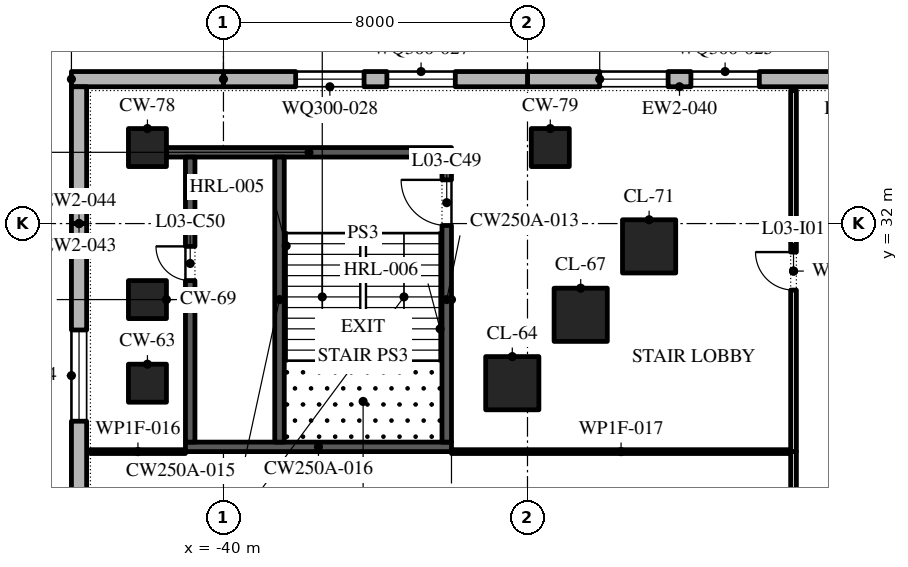
"""IFC4 building model, lengths in metres.
Left out: names, types, materials, properties, quantities, classifications, styles, units other than length and angle.
Written with IfcOpenShell. Run it as: python <this file> out.ifc"""

import sys

from ifc_helpers import new_model, si_unit, direction, frame, frame_2d, origin, origin_2d, place, context, subcontext, project, spatial, polyline, rectangle, outline, extrude, element, fill, save


model = new_model("IFC4")
c1 = context("Model", 3, precision=1e-05, world=origin(), true_north=direction((0.0, 1.0)))
c2 = subcontext(c1, "Body", "Model", "MODEL_VIEW")
j1 = project(units=[si_unit("LENGTHUNIT", "METRE"), si_unit("PLANEANGLEUNIT", "RADIAN")], contexts=[c1])
p1 = place(None, origin())
s1 = spatial("IfcSite", under=j1, at=p1, CompositionType="ELEMENT")
p2 = place(p1, origin())
s2 = spatial("IfcBuilding", under=s1, at=p2, CompositionType="ELEMENT")
p3 = place(p2, frame((0.0, 0.0, 19.2)))
s3 = spatial("IfcBuildingStorey", under=s2, at=p3, CompositionType="ELEMENT", Elevation=19.2)
p4 = place(p3, frame((-42.0, 27.8, 0.0), z_axis=(0.0, 0.0, 1.0), x_axis=(1.0, 0.0, 0.0)))
e1 = element("IfcColumn", 1, at=p4, inside=s3, PredefinedType="COLUMN", context=c2, shape_type="SweptSolid", body=[
    extrude(rectangle(XDim=1.0, YDim=1.0, at=origin_2d()), origin(), (0.0, 0.0, 1.0), 4.8),
])
for number, where, z_axis, x_axis in (
    (2, (-32.4, 27.8, 0.0), (0.0, 0.0, 1.0), (1.0, 0.0, 0.0)),
    (3, (-30.6, 29.6, 0.0), (0.0, 0.0, 1.0), (1.0, 0.0, 0.0)),
):
    element("IfcColumn", number, at=place(p3, frame(where, z_axis=z_axis, x_axis=x_axis)), inside=s3, PredefinedType="COLUMN", context=c2, shape_type="SweptSolid", body=[
        extrude(rectangle(XDim=1.4, YDim=1.4, at=origin_2d()), origin(), (0.0, 0.0, 1.0), 4.8),
    ])
p5 = place(p3, frame((-42.0, 30.0, 0.0), z_axis=(0.0, 0.0, 1.0), x_axis=(1.0, 0.0, 0.0)))
e4 = element("IfcColumn", 4, at=p5, inside=s3, PredefinedType="COLUMN", context=c2, shape_type="SweptSolid", body=[
    extrude(rectangle(XDim=1.0, YDim=1.0, at=origin_2d()), origin(), (0.0, 0.0, 1.0), 4.8),
])
p6 = place(p3, frame((-28.8, 31.4, 0.0), z_axis=(0.0, 0.0, 1.0), x_axis=(1.0, 0.0, 0.0)))
e5 = element("IfcColumn", 5, at=p6, inside=s3, PredefinedType="COLUMN", context=c2, shape_type="SweptSolid", body=[
    extrude(rectangle(XDim=1.4, YDim=1.4, at=origin_2d()), origin(), (0.0, 0.0, 1.0), 4.8),
])
for number, where, z_axis, x_axis in (
    (6, (-42.0, 34.0, 0.0), (0.0, 0.0, 1.0), (1.0, 0.0, 0.0)),
    (7, (-31.4, 34.0, 0.0), (0.0, 0.0, 1.0), (1.0, 0.0, 0.0)),
):
    element("IfcColumn", number, at=place(p3, frame(where, z_axis=z_axis, x_axis=x_axis)), inside=s3, PredefinedType="COLUMN", context=c2, shape_type="SweptSolid", body=[
        extrude(rectangle(XDim=1.0, YDim=1.0, at=origin_2d()), origin(), (0.0, 0.0, 1.0), 4.8),
    ])
p7 = place(p3, frame((-24.0, 35.8, 0.0), z_axis=(0.0, 0.0, 1.0), x_axis=(-1.0, 0.0, 0.0)))
e8 = element("IfcWall", 8, at=p7, inside=s3, PredefinedType="STANDARD", context=c2, shape_type="SweptSolid", body=[
    extrude(rectangle(XDim=8.0, YDim=0.4, at=frame_2d((4.0, 0.0))), origin(), (0.0, 0.0, 1.0), 4.5),
])
p8 = place(p7, frame((1.9, 0.0, 0.9)))
e9 = element("IfcOpeningElement", 9, at=p8, cuts=e8, PredefinedType="OPENING", context=c2, shape_type="SweptSolid", body=[
    extrude(outline(polyline([(0.0, 0.0), (1.8, 0.0), (1.8, 1.5), (1.785, 1.729), (1.738, 1.954), (1.662, 2.17), (1.558, 2.375), (1.427, 2.563), (1.271, 2.732), (1.095, 2.879), (0.9, 3.0), (0.705, 2.879), (0.529, 2.732), (0.373, 2.563), (0.242, 2.375), (0.138, 2.17), (0.062, 1.954), (0.015, 1.729), (0.0, 1.5), (0.0, 0.0)])), frame((0.0, 0.21, 0.0), z_axis=(0.0, -1.0, 0.0), x_axis=(1.0, 0.0, 0.0)), (0.0, 0.0, 1.0), 0.42),
])
p9 = place(p7, frame((4.3, 0.0, 0.9)))
e10 = element("IfcOpeningElement", 10, at=p9, cuts=e8, PredefinedType="OPENING", context=c2, shape_type="SweptSolid", body=[
    extrude(outline(polyline([(0.0, 0.0), (1.8, 0.0), (1.8, 1.5), (1.785, 1.729), (1.738, 1.954), (1.662, 2.17), (1.558, 2.375), (1.427, 2.563), (1.271, 2.732), (1.095, 2.879), (0.9, 3.0), (0.705, 2.879), (0.529, 2.732), (0.373, 2.563), (0.242, 2.375), (0.138, 2.17), (0.062, 1.954), (0.015, 1.729), (0.0, 1.5), (0.0, 0.0)])), frame((0.0, 0.21, 0.0), z_axis=(0.0, -1.0, 0.0), x_axis=(1.0, 0.0, 0.0)), (0.0, 0.0, 1.0), 0.42),
])
p10 = place(p3, frame((-32.0, 35.8, 0.0), z_axis=(0.0, 0.0, 1.0), x_axis=(-1.0, 0.0, 0.0)))
e11 = element("IfcWall", 11, at=p10, inside=s3, PredefinedType="STANDARD", context=c2, shape_type="SweptSolid", body=[
    extrude(rectangle(XDim=8.0, YDim=0.4, at=frame_2d((4.0, 0.0))), origin(), (0.0, 0.0, 1.0), 4.5),
])
p11 = place(p10, frame((1.9, 0.0, 0.9)))
e12 = element("IfcOpeningElement", 12, at=p11, cuts=e11, PredefinedType="OPENING", context=c2, shape_type="SweptSolid", body=[
    extrude(outline(polyline([(0.0, 0.0), (1.8, 0.0), (1.8, 1.5), (1.785, 1.729), (1.738, 1.954), (1.662, 2.17), (1.558, 2.375), (1.427, 2.563), (1.271, 2.732), (1.095, 2.879), (0.9, 3.0), (0.705, 2.879), (0.529, 2.732), (0.373, 2.563), (0.242, 2.375), (0.138, 2.17), (0.062, 1.954), (0.015, 1.729), (0.0, 1.5), (0.0, 0.0)])), frame((0.0, 0.21, 0.0), z_axis=(0.0, -1.0, 0.0), x_axis=(1.0, 0.0, 0.0)), (0.0, 0.0, 1.0), 0.42),
])
p12 = place(p10, frame((4.3, 0.0, 0.9)))
e13 = element("IfcOpeningElement", 13, at=p12, cuts=e11, PredefinedType="OPENING", context=c2, shape_type="SweptSolid", body=[
    extrude(outline(polyline([(0.0, 0.0), (1.8, 0.0), (1.8, 1.5), (1.785, 1.729), (1.738, 1.954), (1.662, 2.17), (1.558, 2.375), (1.427, 2.563), (1.271, 2.732), (1.095, 2.879), (0.9, 3.0), (0.705, 2.879), (0.529, 2.732), (0.373, 2.563), (0.242, 2.375), (0.138, 2.17), (0.062, 1.954), (0.015, 1.729), (0.0, 1.5), (0.0, 0.0)])), frame((0.0, 0.21, 0.0), z_axis=(0.0, -1.0, 0.0), x_axis=(1.0, 0.0, 0.0)), (0.0, 0.0, 1.0), 0.42),
])
p13 = place(p3, frame((-40.0, 35.8, 0.0), z_axis=(0.0, 0.0, 1.0), x_axis=(-1.0, 0.0, 0.0)))
e14 = element("IfcWall", 14, at=p13, inside=s3, PredefinedType="STANDARD", context=c2, shape_type="SweptSolid", body=[
    extrude(rectangle(XDim=4.0, YDim=0.4, at=frame_2d((2.0, 0.0))), origin(), (0.0, 0.0, 1.0), 4.5),
])
p14 = place(p3, frame((-43.8, 35.6, 0.0), z_axis=(0.0, 0.0, 1.0), x_axis=(0.0, -1.0, 0.0)))
e15 = element("IfcWall", 15, at=p14, inside=s3, PredefinedType="STANDARD", context=c2, shape_type="SweptSolid", body=[
    extrude(rectangle(XDim=3.6, YDim=0.4, at=frame_2d((1.8, 0.0))), origin(), (0.0, 0.0, 1.0), 4.5),
])
p15 = place(p3, frame((-43.8, 32.0, 0.0), z_axis=(0.0, 0.0, 1.0), x_axis=(0.0, -1.0, 0.0)))
e16 = element("IfcWall", 16, at=p15, inside=s3, PredefinedType="STANDARD", context=c2, shape_type="SweptSolid", body=[
    extrude(rectangle(XDim=8.0, YDim=0.4, at=frame_2d((4.0, 0.0))), origin(), (0.0, 0.0, 1.0), 4.5),
])
p16 = place(p15, frame((2.8, 0.0, 0.9)))
e17 = element("IfcOpeningElement", 17, at=p16, cuts=e16, PredefinedType="OPENING", context=c2, shape_type="SweptSolid", body=[
    extrude(outline(polyline([(0.0, 0.0), (2.4, 0.0), (2.4, 1.5), (2.378, 1.758), (2.313, 2.009), (2.207, 2.245), (2.063, 2.46), (1.885, 2.648), (1.677, 2.804), (1.447, 2.922), (1.2, 3.0), (0.953, 2.922), (0.722, 2.804), (0.515, 2.648), (0.337, 2.46), (0.193, 2.245), (0.087, 2.009), (0.022, 1.758), (0.0, 1.5), (0.0, 0.0)])), frame((0.0, 0.21, 0.0), z_axis=(0.0, -1.0, 0.0), x_axis=(1.0, 0.0, 0.0)), (0.0, 0.0, 1.0), 0.42),
])
p17 = place(p3, frame((-41.0, 26.125, 0.0), z_axis=(0.0, 0.0, 1.0), x_axis=(1.0, 0.0, 0.0)))
e18 = element("IfcWall", 18, at=p17, inside=s3, PredefinedType="SHEAR", context=c2, shape_type="SweptSolid", body=[
    extrude(rectangle(XDim=7.0, YDim=0.25, at=frame_2d((3.5, 0.0))), origin(), (0.0, 0.0, 1.0), 4.5),
])
p18 = place(p3, frame((-41.5, 33.875, 0.0), z_axis=(0.0, 0.0, 1.0), x_axis=(1.0, 0.0, 0.0)))
e19 = element("IfcWall", 19, at=p18, inside=s3, PredefinedType="SHEAR", context=c2, shape_type="SweptSolid", body=[
    extrude(rectangle(XDim=7.5, YDim=0.25, at=frame_2d((3.75, 0.0))), origin(), (0.0, 0.0, 1.0), 4.5),
])
p19 = place(p3, frame((-40.875, 26.25, 0.0), z_axis=(0.0, 0.0, 1.0), x_axis=(0.0, 1.0, 0.0)))
e20 = element("IfcWall", 20, at=p19, inside=s3, PredefinedType="SHEAR", context=c2, shape_type="SweptSolid", body=[
    extrude(rectangle(XDim=7.5, YDim=0.25, at=frame_2d((3.75, 0.0))), origin(), (0.0, 0.0, 1.0), 4.5),
])
p20 = place(p19, frame((4.25, 0.0, 0.0)))
e21 = element("IfcOpeningElement", 21, at=p20, cuts=e20, PredefinedType="OPENING", context=c2, shape_type="SweptSolid", body=[
    extrude(rectangle(XDim=0.9, YDim=2.1, at=frame_2d((0.45, 1.05))), frame((0.0, 0.135, 0.0), z_axis=(0.0, -1.0, 0.0), x_axis=(1.0, 0.0, 0.0)), (0.0, 0.0, 1.0), 0.27),
])
p21 = place(p3, frame((-34.125, 26.25, 0.0), z_axis=(0.0, 0.0, 1.0), x_axis=(0.0, 1.0, 0.0)))
e22 = element("IfcWall", 22, at=p21, inside=s3, PredefinedType="SHEAR", context=c2, shape_type="SweptSolid", body=[
    extrude(rectangle(XDim=7.5, YDim=0.25, at=frame_2d((3.75, 0.0))), origin(), (0.0, 0.0, 1.0), 4.5),
])
p22 = place(p21, frame((5.7, 0.0, 0.0)))
e23 = element("IfcOpeningElement", 23, at=p22, cuts=e22, PredefinedType="OPENING", context=c2, shape_type="SweptSolid", body=[
    extrude(rectangle(XDim=1.2, YDim=2.1, at=frame_2d((0.6, 1.05))), frame((0.0, 0.135, 0.0), z_axis=(0.0, -1.0, 0.0), x_axis=(1.0, 0.0, 0.0)), (0.0, 0.0, 1.0), 0.27),
])
p23 = place(p3, frame((-38.525, 26.25, 0.0), z_axis=(0.0, 0.0, 1.0), x_axis=(0.0, 1.0, 0.0)))
e24 = element("IfcWall", 24, at=p23, inside=s3, PredefinedType="SHEAR", context=c2, shape_type="SweptSolid", body=[
    extrude(rectangle(XDim=7.5, YDim=0.25, at=frame_2d((3.75, 0.0))), origin(), (0.0, 0.0, 1.0), 4.5),
])
p24 = place(p3, frame((-43.5, 26.0, 0.0), z_axis=(0.0, 0.0, 1.0), x_axis=(1.0, 0.0, 0.0)))
e25 = element("IfcWall", 25, at=p24, inside=s3, PredefinedType="PARTITIONING", context=c2, shape_type="SweptSolid", body=[
    extrude(rectangle(XDim=2.5, YDim=0.1, at=frame_2d((1.25, 0.0))), origin(), (0.0, 0.0, 1.0), 4.5),
])
p25 = place(p3, frame((-34.0, 26.0, 0.0), z_axis=(0.0, 0.0, 1.0), x_axis=(1.0, 0.0, 0.0)))
e26 = element("IfcWall", 26, at=p25, inside=s3, PredefinedType="PARTITIONING", context=c2, shape_type="SweptSolid", body=[
    extrude(rectangle(XDim=8.925, YDim=0.1, at=frame_2d((4.462, 0.0))), origin(), (0.0, 0.0, 1.0), 4.5),
])
p26 = place(p3, frame((-25.0, 17.0, 0.0), z_axis=(0.0, 0.0, 1.0), x_axis=(0.0, 1.0, 0.0)))
e27 = element("IfcWall", 27, at=p26, inside=s3, PredefinedType="PARTITIONING", context=c2, shape_type="SweptSolid", body=[
    extrude(rectangle(XDim=9.0, YDim=0.15, at=frame_2d((4.5, 0.0))), origin(), (0.0, 0.0, 1.0), 4.5),
])
p27 = place(p26, frame((3.6, 0.0, 0.0)))
e28 = element("IfcOpeningElement", 28, at=p27, cuts=e27, PredefinedType="OPENING", context=c2, shape_type="SweptSolid", body=[
    extrude(rectangle(XDim=1.8, YDim=2.1, at=frame_2d((0.9, 1.05))), frame((0.0, 0.085, 0.0), z_axis=(0.0, -1.0, 0.0), x_axis=(1.0, 0.0, 0.0)), (0.0, 0.0, 1.0), 0.17),
])
p28 = place(p3, frame((-25.0, 26.0, 0.0), z_axis=(0.0, 0.0, 1.0), x_axis=(0.0, 1.0, 0.0)))
e29 = element("IfcWall", 29, at=p28, inside=s3, PredefinedType="PARTITIONING", context=c2, shape_type="SweptSolid", body=[
    extrude(rectangle(XDim=9.5, YDim=0.15, at=frame_2d((4.75, 0.0))), origin(), (0.0, 0.0, 1.0), 4.5),
])
p29 = place(p28, frame((4.25, 0.0, 0.0)))
e30 = element("IfcOpeningElement", 30, at=p29, cuts=e29, PredefinedType="OPENING", context=c2, shape_type="SweptSolid", body=[
    extrude(rectangle(XDim=1.0, YDim=2.1, at=frame_2d((0.5, 1.05))), frame((0.0, 0.085, 0.0), z_axis=(0.0, -1.0, 0.0), x_axis=(1.0, 0.0, 0.0)), (0.0, 0.0, 1.0), 0.17),
])
p30 = place(p8, origin())
e31 = element("IfcWindow", 31, at=p30, inside=s3, PartitioningType="DOUBLE_PANEL_VERTICAL", PredefinedType="WINDOW", context=c2, shape_type="SweptSolid", body=[
    extrude(outline(polyline([(0.0, 0.0), (1.8, 0.0), (1.8, 1.5), (1.785, 1.729), (1.738, 1.954), (1.662, 2.17), (1.558, 2.375), (1.427, 2.563), (1.271, 2.732), (1.095, 2.879), (0.9, 3.0), (0.705, 2.879), (0.529, 2.732), (0.373, 2.563), (0.242, 2.375), (0.138, 2.17), (0.062, 1.954), (0.015, 1.729), (0.0, 1.5), (0.0, 0.0)])), frame((0.0, 0.03, 0.0), z_axis=(0.0, -1.0, 0.0), x_axis=(1.0, 0.0, 0.0)), (0.0, 0.0, 1.0), 0.06),
])
fill(e9, e31)
p31 = place(p9, origin())
e32 = element("IfcWindow", 32, at=p31, inside=s3, PartitioningType="DOUBLE_PANEL_VERTICAL", PredefinedType="WINDOW", context=c2, shape_type="SweptSolid", body=[
    extrude(outline(polyline([(0.0, 0.0), (1.8, 0.0), (1.8, 1.5), (1.785, 1.729), (1.738, 1.954), (1.662, 2.17), (1.558, 2.375), (1.427, 2.563), (1.271, 2.732), (1.095, 2.879), (0.9, 3.0), (0.705, 2.879), (0.529, 2.732), (0.373, 2.563), (0.242, 2.375), (0.138, 2.17), (0.062, 1.954), (0.015, 1.729), (0.0, 1.5), (0.0, 0.0)])), frame((0.0, 0.03, 0.0), z_axis=(0.0, -1.0, 0.0), x_axis=(1.0, 0.0, 0.0)), (0.0, 0.0, 1.0), 0.06),
])
fill(e10, e32)
p32 = place(p11, origin())
e33 = element("IfcWindow", 33, at=p32, inside=s3, PartitioningType="DOUBLE_PANEL_VERTICAL", PredefinedType="WINDOW", context=c2, shape_type="SweptSolid", body=[
    extrude(outline(polyline([(0.0, 0.0), (1.8, 0.0), (1.8, 1.5), (1.785, 1.729), (1.738, 1.954), (1.662, 2.17), (1.558, 2.375), (1.427, 2.563), (1.271, 2.732), (1.095, 2.879), (0.9, 3.0), (0.705, 2.879), (0.529, 2.732), (0.373, 2.563), (0.242, 2.375), (0.138, 2.17), (0.062, 1.954), (0.015, 1.729), (0.0, 1.5), (0.0, 0.0)])), frame((0.0, 0.03, 0.0), z_axis=(0.0, -1.0, 0.0), x_axis=(1.0, 0.0, 0.0)), (0.0, 0.0, 1.0), 0.06),
])
fill(e12, e33)
p33 = place(p12, origin())
e34 = element("IfcWindow", 34, at=p33, inside=s3, PartitioningType="DOUBLE_PANEL_VERTICAL", PredefinedType="WINDOW", context=c2, shape_type="SweptSolid", body=[
    extrude(outline(polyline([(0.0, 0.0), (1.8, 0.0), (1.8, 1.5), (1.785, 1.729), (1.738, 1.954), (1.662, 2.17), (1.558, 2.375), (1.427, 2.563), (1.271, 2.732), (1.095, 2.879), (0.9, 3.0), (0.705, 2.879), (0.529, 2.732), (0.373, 2.563), (0.242, 2.375), (0.138, 2.17), (0.062, 1.954), (0.015, 1.729), (0.0, 1.5), (0.0, 0.0)])), frame((0.0, 0.03, 0.0), z_axis=(0.0, -1.0, 0.0), x_axis=(1.0, 0.0, 0.0)), (0.0, 0.0, 1.0), 0.06),
])
fill(e13, e34)
p34 = place(p16, origin())
e35 = element("IfcWindow", 35, at=p34, inside=s3, PartitioningType="DOUBLE_PANEL_VERTICAL", PredefinedType="WINDOW", context=c2, shape_type="SweptSolid", body=[
    extrude(outline(polyline([(0.0, 0.0), (2.4, 0.0), (2.4, 1.5), (2.378, 1.758), (2.313, 2.009), (2.207, 2.245), (2.063, 2.46), (1.885, 2.648), (1.677, 2.804), (1.447, 2.922), (1.2, 3.0), (0.953, 2.922), (0.722, 2.804), (0.515, 2.648), (0.337, 2.46), (0.193, 2.245), (0.087, 2.009), (0.022, 1.758), (0.0, 1.5), (0.0, 0.0)])), frame((0.0, 0.03, 0.0), z_axis=(0.0, -1.0, 0.0), x_axis=(1.0, 0.0, 0.0)), (0.0, 0.0, 1.0), 0.06),
])
fill(e17, e35)
p35 = place(p22, origin())
e36 = element("IfcDoor", 36, at=p35, inside=s3, OperationType="SINGLE_SWING_LEFT", PredefinedType="DOOR", context=c2, shape_type="SweptSolid", body=[
    extrude(rectangle(XDim=1.2, YDim=2.1, at=frame_2d((0.6, 1.05))), frame((0.0, 0.025, 0.0), z_axis=(0.0, -1.0, 0.0), x_axis=(1.0, 0.0, 0.0)), (0.0, 0.0, 1.0), 0.05),
])
fill(e23, e36)
p36 = place(p20, origin())
e37 = element("IfcDoor", 37, at=p36, inside=s3, OperationType="SINGLE_SWING_LEFT", PredefinedType="DOOR", context=c2, shape_type="SweptSolid", body=[
    extrude(rectangle(XDim=0.9, YDim=2.1, at=frame_2d((0.45, 1.05))), frame((0.0, -0.075, 0.0), z_axis=(0.0, -1.0, 0.0), x_axis=(1.0, 0.0, 0.0)), (0.0, 0.0, 1.0), 0.05),
])
fill(e21, e37)
p37 = place(p29, origin())
e38 = element("IfcDoor", 38, at=p37, inside=s3, OperationType="SINGLE_SWING_LEFT", PredefinedType="DOOR", context=c2, shape_type="SweptSolid", body=[
    extrude(rectangle(XDim=1.0, YDim=2.1, at=frame_2d((0.5, 1.05))), frame((0.0, 0.025, 0.0), z_axis=(0.0, -1.0, 0.0), x_axis=(1.0, 0.0, 0.0)), (0.0, 0.0, 1.0), 0.05),
])
fill(e30, e38)
save(model, sys.argv[1])
